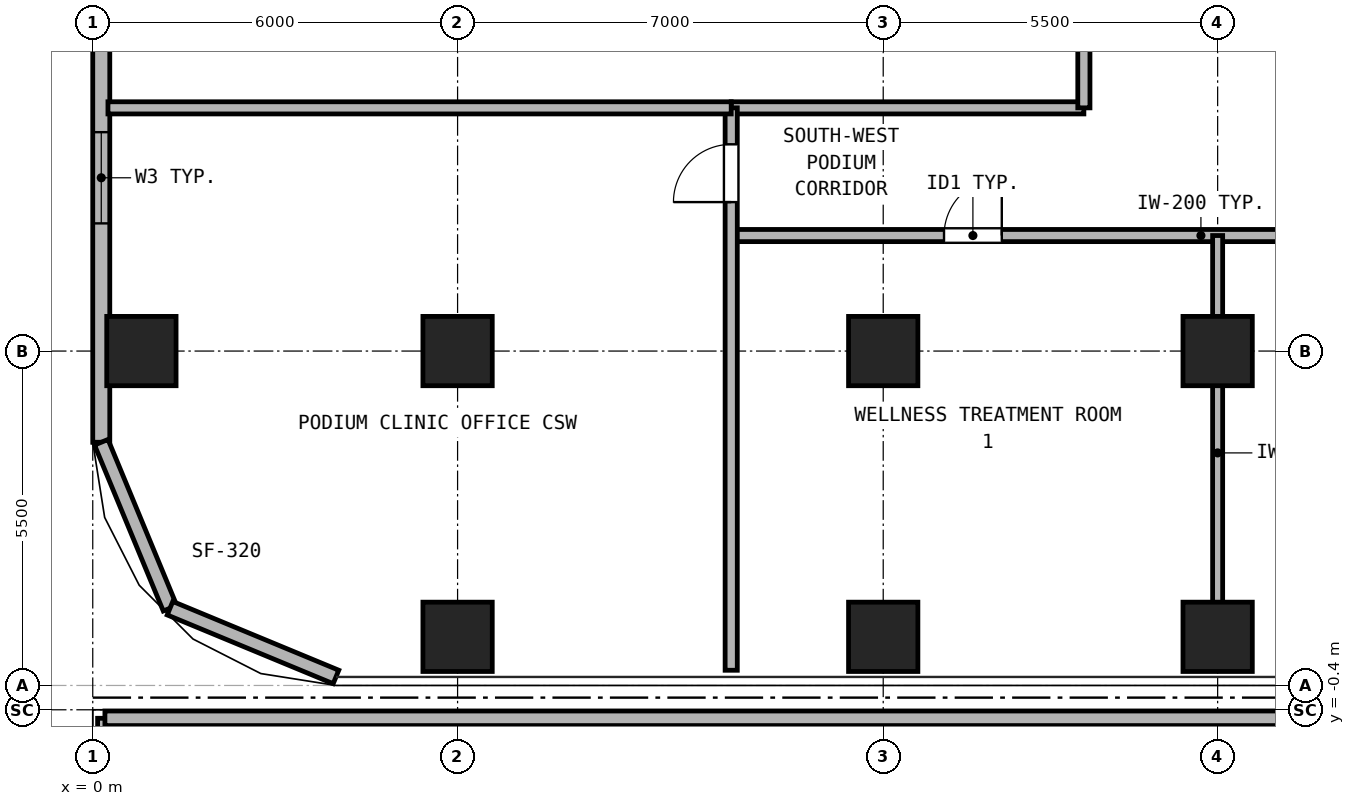
"""IFC4 building model, lengths in metres.
Left out: names, types, materials, properties, quantities, classifications, styles, units other than length and angle.
Written with IfcOpenShell. Run it as: python <this file> out.ifc"""

import sys

from ifc_helpers import new_model, si_unit, direction, frame, frame_2d, origin, origin_2d, place, context, subcontext, project, spatial, rectangle, hollow_rectangle, extrude, source, transform, mapped, element, fill, save


model = new_model("IFC4")
c1 = context("Model", 3, precision=1e-05, world=origin(), true_north=direction((0.0, 1.0)))
c2 = subcontext(c1, "Body", "Model", "MODEL_VIEW")
j1 = project(units=[si_unit("LENGTHUNIT", "METRE"), si_unit("PLANEANGLEUNIT", "RADIAN")], contexts=[c1])
p1 = place(None, origin())
s1 = spatial("IfcSite", under=j1, at=p1, CompositionType="ELEMENT")
p2 = place(p1, origin())
s2 = spatial("IfcBuilding", under=s1, at=p2, CompositionType="ELEMENT")
p3 = place(p2, frame((0.0, 0.0, 13.5)))
s3 = spatial("IfcBuildingStorey", under=s2, at=p3, CompositionType="ELEMENT", Elevation=13.5)
m1 = source(origin(), c2, "Body", "SweptSolid", [
    extrude(hollow_rectangle(XDim=1.14, YDim=1.14, WallThickness=0.07, at=origin_2d()), origin(), (0.0, 0.0, 1.0), 4.18),
])
for number, where, z_axis, x_axis in (
    (1, (6.0, 0.8, 0.0), (0.0, 0.0, 1.0), (1.0, 0.0, 0.0)),
    (2, (13.0, 0.8, 0.0), (0.0, 0.0, 1.0), (1.0, 0.0, 0.0)),
    (3, (18.5, 0.8, 0.0), (0.0, 0.0, 1.0), (1.0, 0.0, 0.0)),
    (4, (0.8, 5.5, 0.0), (0.0, 0.0, 1.0), (1.0, 0.0, 0.0)),
    (5, (6.0, 5.5, 0.0), (0.0, 0.0, 1.0), (1.0, 0.0, 0.0)),
    (6, (13.0, 5.5, 0.0), (0.0, 0.0, 1.0), (1.0, 0.0, 0.0)),
    (7, (18.5, 5.5, 0.0), (0.0, 0.0, 1.0), (1.0, 0.0, 0.0)),
):
    element("IfcColumn", number, at=place(p3, frame(where, z_axis=z_axis, x_axis=x_axis)), inside=s3, PredefinedType="COLUMN", context=c2, shape_type="MappedRepresentation", body=[
        mapped(m1, transform((0.0, 0.0, 0.0), x_axis=(1.0, 0.0, 0.0), y_axis=(0.0, 1.0, 0.0), z_axis=(0.0, 0.0, 1.0), scale=1.0)),
    ])
p4 = place(p3, frame((0.14, 4.0, 0.0), z_axis=(0.0, 0.0, 1.0), x_axis=(0.0, 1.0, 0.0)))
e8 = element("IfcWall", 8, at=p4, inside=s3, PredefinedType="SOLIDWALL", context=c2, shape_type="SweptSolid", body=[
    extrude(rectangle(XDim=32.5, YDim=0.28, at=frame_2d((16.25, 0.0))), origin(), (0.0, 0.0, 1.0), 4.18),
])
p5 = place(p4, frame((3.6, 0.0, 0.9)))
e9 = element("IfcOpeningElement", 9, at=p5, cuts=e8, PredefinedType="OPENING", context=c2, shape_type="SweptSolid", body=[
    extrude(rectangle(XDim=1.5, YDim=1.8, at=frame_2d((0.75, 0.9))), frame((0.0, 0.15, 0.0), z_axis=(0.0, -1.0, 0.0), x_axis=(1.0, 0.0, 0.0)), (0.0, 0.0, 1.0), 0.3),
])
p6 = place(p4, frame((9.8, 0.0, 0.9)))
e10 = element("IfcOpeningElement", 10, at=p6, cuts=e8, PredefinedType="OPENING", context=c2, shape_type="SweptSolid", body=[
    extrude(rectangle(XDim=1.5, YDim=1.8, at=frame_2d((0.75, 0.9))), frame((0.0, 0.15, 0.0), z_axis=(0.0, -1.0, 0.0), x_axis=(1.0, 0.0, 0.0)), (0.0, 0.0, 1.0), 0.3),
])
p7 = place(p4, frame((15.8, 0.0, 0.9)))
e11 = element("IfcOpeningElement", 11, at=p7, cuts=e8, PredefinedType="OPENING", context=c2, shape_type="SweptSolid", body=[
    extrude(rectangle(XDim=1.5, YDim=1.8, at=frame_2d((0.75, 0.9))), frame((0.0, 0.15, 0.0), z_axis=(0.0, -1.0, 0.0), x_axis=(1.0, 0.0, 0.0)), (0.0, 0.0, 1.0), 0.3),
])
p8 = place(p4, frame((22.0, 0.0, 0.9)))
e12 = element("IfcOpeningElement", 12, at=p8, cuts=e8, PredefinedType="OPENING", context=c2, shape_type="SweptSolid", body=[
    extrude(rectangle(XDim=1.5, YDim=1.8, at=frame_2d((0.75, 0.9))), frame((0.0, 0.15, 0.0), z_axis=(0.0, -1.0, 0.0), x_axis=(1.0, 0.0, 0.0)), (0.0, 0.0, 1.0), 0.3),
])
p9 = place(p4, frame((28.0, 0.0, 0.9)))
e13 = element("IfcOpeningElement", 13, at=p9, cuts=e8, PredefinedType="OPENING", context=c2, shape_type="SweptSolid", body=[
    extrude(rectangle(XDim=1.5, YDim=1.8, at=frame_2d((0.75, 0.9))), frame((0.0, 0.15, 0.0), z_axis=(0.0, -1.0, 0.0), x_axis=(1.0, 0.0, 0.0)), (0.0, 0.0, 1.0), 0.3),
])
for number, where, z_axis, x_axis in (
    (14, (0.14, 4.0, 0.0), (0.0, 0.0, 1.0), (0.383, -0.924, 0.0)),
    (15, (1.271, 1.271, 0.0), (0.0, 0.0, 1.0), (0.924, -0.383, 0.0)),
):
    element("IfcWall", number, at=place(p3, frame(where, z_axis=z_axis, x_axis=x_axis)), inside=s3, PredefinedType="SOLIDWALL", context=c2, shape_type="SweptSolid", body=[
        extrude(rectangle(XDim=2.954, YDim=0.24, at=frame_2d((1.477, 0.0))), origin(), (0.0, 0.0, 1.0), 4.18),
    ])
p10 = place(p3, frame((0.2, -10.95, 0.0), z_axis=(0.0, 0.0, 1.0), x_axis=(0.0, 1.0, 0.0)))
e16 = element("IfcWall", 16, at=p10, inside=s3, PredefinedType="SOLIDWALL", context=c2, shape_type="SweptSolid", body=[
    extrude(rectangle(XDim=10.41, YDim=0.24, at=frame_2d((5.205, 0.0))), origin(), (0.0, 0.0, 1.0), 4.18),
])
p11 = place(p3, frame((0.2, -0.54, 0.0), z_axis=(0.0, 0.0, 1.0), x_axis=(1.0, 0.0, 0.0)))
e17 = element("IfcWall", 17, at=p11, inside=s3, PredefinedType="SOLIDWALL", context=c2, shape_type="SweptSolid", body=[
    extrude(rectangle(XDim=47.34, YDim=0.24, at=frame_2d((23.67, 0.0))), origin(), (0.0, 0.0, 1.0), 4.18),
])
p12 = place(p3, frame((10.5, 7.4, 0.0), z_axis=(0.0, 0.0, 1.0), x_axis=(1.0, 0.0, 0.0)))
e18 = element("IfcWall", 18, at=p12, inside=s3, PredefinedType="PARTITIONING", context=c2, shape_type="SweptSolid", body=[
    extrude(rectangle(XDim=26.0, YDim=0.2, at=frame_2d((13.0, 0.0))), origin(), (0.0, 0.0, 1.0), 4.18),
])
p13 = place(p12, frame((3.5, 0.0, 0.0)))
e19 = element("IfcOpeningElement", 19, at=p13, cuts=e18, PredefinedType="OPENING", context=c2, shape_type="SweptSolid", body=[
    extrude(rectangle(XDim=0.95, YDim=2.15, at=frame_2d((0.475, 1.075))), frame((0.0, 0.11, 0.0), z_axis=(0.0, -1.0, 0.0), x_axis=(1.0, 0.0, 0.0)), (0.0, 0.0, 1.0), 0.22),
])
p14 = place(p12, frame((11.0, 0.0, 0.0)))
e20 = element("IfcOpeningElement", 20, at=p14, cuts=e18, PredefinedType="OPENING", context=c2, shape_type="SweptSolid", body=[
    extrude(rectangle(XDim=0.95, YDim=2.15, at=frame_2d((0.475, 1.075))), frame((0.0, 0.11, 0.0), z_axis=(0.0, -1.0, 0.0), x_axis=(1.0, 0.0, 0.0)), (0.0, 0.0, 1.0), 0.22),
])
p15 = place(p12, frame((17.15, 0.0, 0.0)))
e21 = element("IfcOpeningElement", 21, at=p15, cuts=e18, PredefinedType="OPENING", context=c2, shape_type="SweptSolid", body=[
    extrude(rectangle(XDim=0.95, YDim=2.15, at=frame_2d((0.475, 1.075))), frame((0.0, 0.11, 0.0), z_axis=(0.0, -1.0, 0.0), x_axis=(1.0, 0.0, 0.0)), (0.0, 0.0, 1.0), 0.22),
])
p16 = place(p12, frame((21.2, 0.0, 0.0)))
e22 = element("IfcOpeningElement", 22, at=p16, cuts=e18, PredefinedType="OPENING", context=c2, shape_type="SweptSolid", body=[
    extrude(rectangle(XDim=0.92, YDim=2.1, at=frame_2d((0.46, 1.05))), frame((0.0, 0.11, 0.0), z_axis=(0.0, -1.0, 0.0), x_axis=(1.0, 0.0, 0.0)), (0.0, 0.0, 1.0), 0.22),
])
p17 = place(p12, frame((24.05, 0.0, 0.0)))
e23 = element("IfcOpeningElement", 23, at=p17, cuts=e18, PredefinedType="OPENING", context=c2, shape_type="SweptSolid", body=[
    extrude(rectangle(XDim=0.92, YDim=2.1, at=frame_2d((0.46, 1.05))), frame((0.0, 0.11, 0.0), z_axis=(0.0, -1.0, 0.0), x_axis=(1.0, 0.0, 0.0)), (0.0, 0.0, 1.0), 0.22),
])
p18 = place(p3, frame((10.5, 9.5, 0.0), z_axis=(0.0, 0.0, 1.0), x_axis=(1.0, 0.0, 0.0)))
e24 = element("IfcWall", 24, at=p18, inside=s3, PredefinedType="PARTITIONING", context=c2, shape_type="SweptSolid", body=[
    extrude(rectangle(XDim=5.8, YDim=0.2, at=frame_2d((2.9, 0.0))), origin(), (0.0, 0.0, 1.0), 4.18),
])
p19 = place(p3, frame((16.3, 9.5, 0.0), z_axis=(0.0, 0.0, 1.0), x_axis=(0.0, 1.0, 0.0)))
e25 = element("IfcWall", 25, at=p19, inside=s3, PredefinedType="PARTITIONING", context=c2, shape_type="SweptSolid", body=[
    extrude(rectangle(XDim=20.7, YDim=0.2, at=frame_2d((10.35, 0.0))), origin(), (0.0, 0.0, 1.0), 4.18),
])
p20 = place(p19, frame((5.0, 0.0, 0.0)))
e26 = element("IfcOpeningElement", 26, at=p20, cuts=e25, PredefinedType="OPENING", context=c2, shape_type="SweptSolid", body=[
    extrude(rectangle(XDim=0.95, YDim=2.15, at=frame_2d((0.475, 1.075))), frame((0.0, 0.11, 0.0), z_axis=(0.0, -1.0, 0.0), x_axis=(1.0, 0.0, 0.0)), (0.0, 0.0, 1.0), 0.22),
])
p21 = place(p19, frame((15.35, 0.0, 0.0)))
e27 = element("IfcOpeningElement", 27, at=p21, cuts=e25, PredefinedType="OPENING", context=c2, shape_type="SweptSolid", body=[
    extrude(rectangle(XDim=0.95, YDim=2.15, at=frame_2d((0.475, 1.075))), frame((0.0, 0.11, 0.0), z_axis=(0.0, -1.0, 0.0), x_axis=(1.0, 0.0, 0.0)), (0.0, 0.0, 1.0), 0.22),
])
p22 = place(p3, frame((10.5, 0.25, 0.0), z_axis=(0.0, 0.0, 1.0), x_axis=(0.0, 1.0, 0.0)))
e28 = element("IfcWall", 28, at=p22, inside=s3, PredefinedType="PARTITIONING", context=c2, shape_type="SweptSolid", body=[
    extrude(rectangle(XDim=9.25, YDim=0.2, at=frame_2d((4.625, 0.0))), origin(), (0.0, 0.0, 1.0), 4.18),
])
p23 = place(p22, frame((7.7, 0.0, 0.0)))
e29 = element("IfcOpeningElement", 29, at=p23, cuts=e28, PredefinedType="OPENING", context=c2, shape_type="SweptSolid", body=[
    extrude(rectangle(XDim=0.95, YDim=2.15, at=frame_2d((0.475, 1.075))), frame((0.0, 0.11, 0.0), z_axis=(0.0, -1.0, 0.0), x_axis=(1.0, 0.0, 0.0)), (0.0, 0.0, 1.0), 0.22),
])
p24 = place(p3, frame((0.25, 9.5, 0.0), z_axis=(0.0, 0.0, 1.0), x_axis=(1.0, 0.0, 0.0)))
e30 = element("IfcWall", 30, at=p24, inside=s3, PredefinedType="PARTITIONING", context=c2, shape_type="SweptSolid", body=[
    extrude(rectangle(XDim=10.25, YDim=0.2, at=frame_2d((5.125, 0.0))), origin(), (0.0, 0.0, 1.0), 4.18),
])
p25 = place(p3, frame((18.5, 0.25, 0.0), z_axis=(0.0, 0.0, 1.0), x_axis=(0.0, 1.0, 0.0)))
e31 = element("IfcWall", 31, at=p25, inside=s3, PredefinedType="PARTITIONING", context=c2, shape_type="SweptSolid", body=[
    extrude(rectangle(XDim=7.15, YDim=0.165, at=frame_2d((3.575, 0.0))), origin(), (0.0, 0.0, 1.0), 3.253),
])
p26 = place(p5, origin())
e32 = element("IfcWindow", 32, at=p26, inside=s3, PartitioningType="SINGLE_PANEL", PredefinedType="WINDOW", context=c2, shape_type="SweptSolid", body=[
    extrude(rectangle(XDim=1.5, YDim=1.8, at=frame_2d((0.75, 0.9))), frame((0.0, 0.03, 0.0), z_axis=(0.0, -1.0, 0.0), x_axis=(1.0, 0.0, 0.0)), (0.0, 0.0, 1.0), 0.06),
])
fill(e9, e32)
p27 = place(p13, frame((0.95, 0.0, 0.0), z_axis=(0.0, 0.0, 1.0), x_axis=(-1.0, 0.0, 0.0)))
e33 = element("IfcDoor", 33, at=p27, inside=s3, OperationType="SINGLE_SWING_RIGHT", PredefinedType="DOOR", context=c2, shape_type="SweptSolid", body=[
    extrude(rectangle(XDim=0.95, YDim=2.15, at=frame_2d((0.475, 1.075))), frame((0.0, 0.025, 0.0), z_axis=(0.0, -1.0, 0.0), x_axis=(1.0, 0.0, 0.0)), (0.0, 0.0, 1.0), 0.05),
])
fill(e19, e33)
p28 = place(p23, frame((0.95, 0.0, 0.0), z_axis=(0.0, 0.0, 1.0), x_axis=(-1.0, 0.0, 0.0)))
e34 = element("IfcDoor", 34, at=p28, inside=s3, OperationType="SINGLE_SWING_LEFT", PredefinedType="DOOR", context=c2, shape_type="SweptSolid", body=[
    extrude(rectangle(XDim=0.95, YDim=2.15, at=frame_2d((0.475, 1.075))), frame((0.0, 0.025, 0.0), z_axis=(0.0, -1.0, 0.0), x_axis=(1.0, 0.0, 0.0)), (0.0, 0.0, 1.0), 0.05),
])
fill(e29, e34)
save(model, sys.argv[1])
